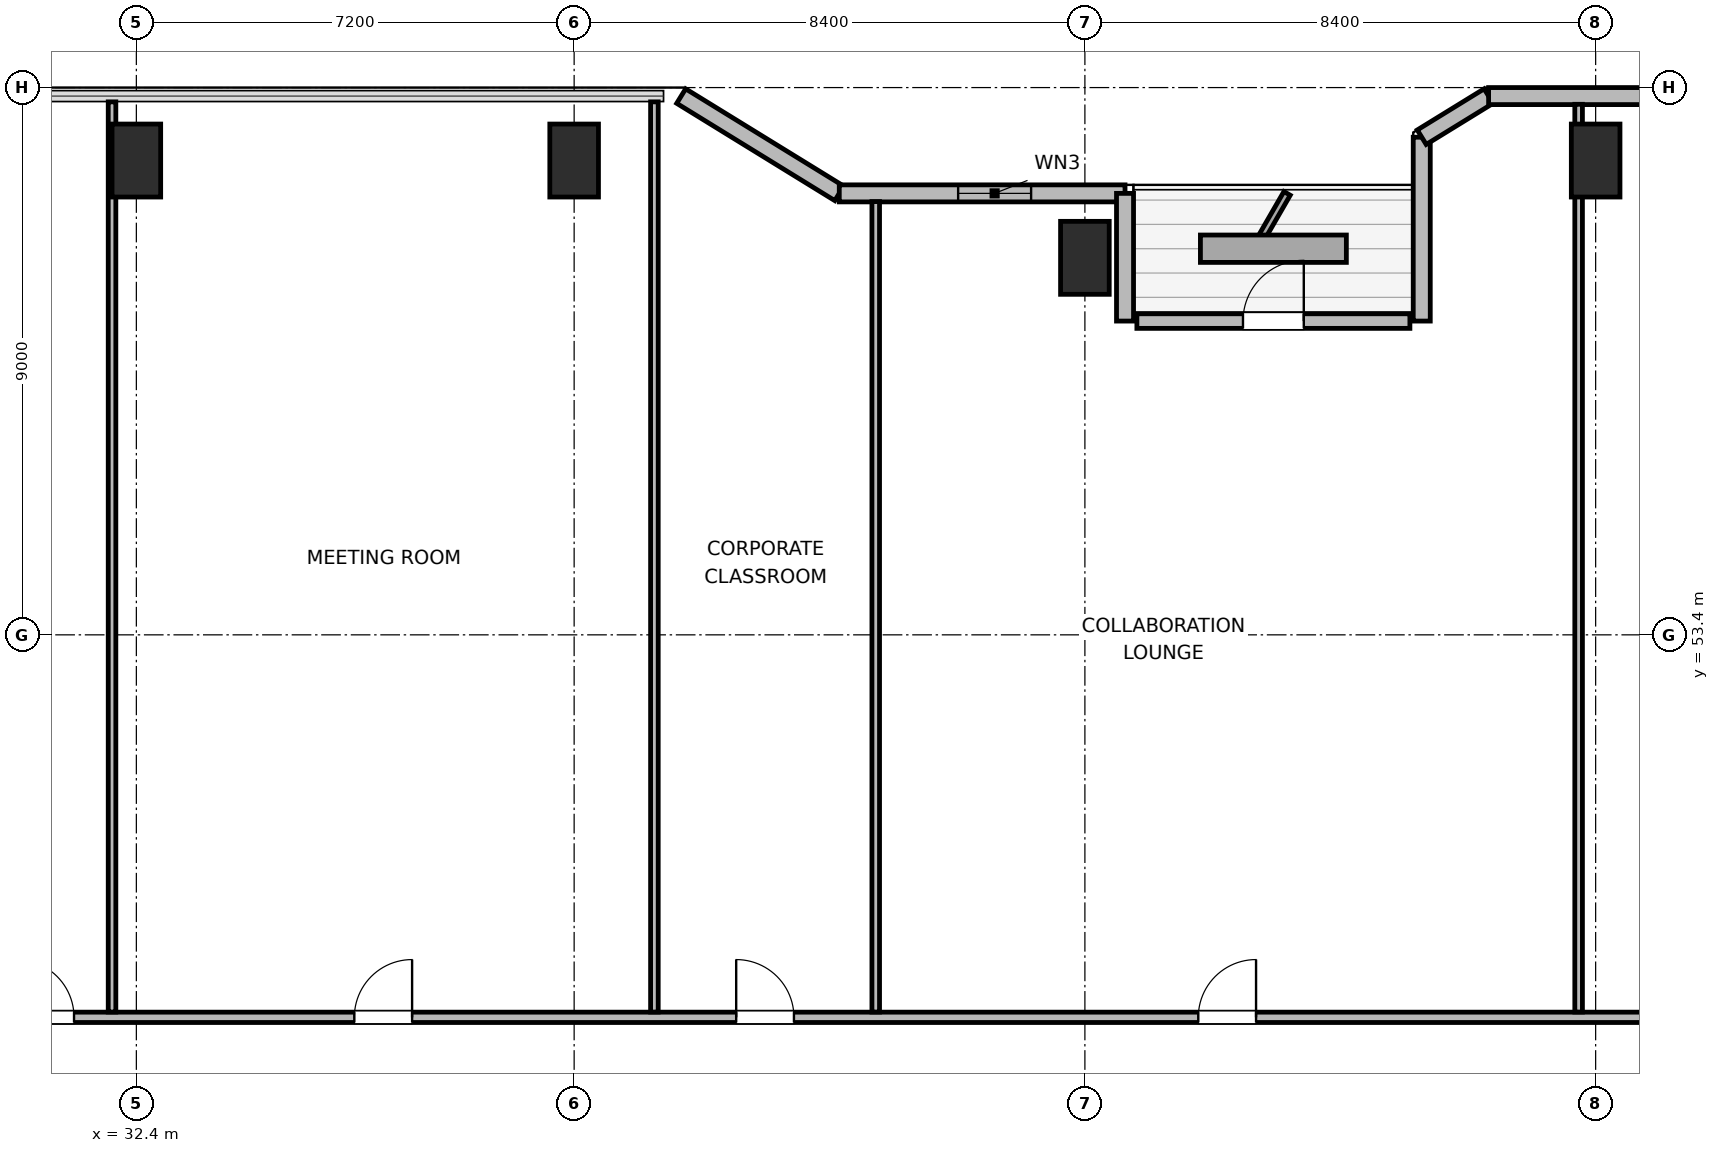
"""IFC4 building model, lengths in metres.
Left out: names, types, materials, properties, quantities, classifications, styles, units other than length and angle.
Written with IfcOpenShell. Run it as: python <this file> out.ifc"""

import sys

from ifc_helpers import new_model, si_unit, direction, frame, frame_2d, origin, origin_2d, place, context, subcontext, project, spatial, rectangle, extrude, element, fill, save


model = new_model("IFC4")
c1 = context("Model", 3, precision=1e-05, world=origin(), true_north=direction((0.0, 1.0)))
c2 = subcontext(c1, "Body", "Model", "MODEL_VIEW")
j1 = project(units=[si_unit("LENGTHUNIT", "METRE"), si_unit("PLANEANGLEUNIT", "RADIAN")], contexts=[c1])
p1 = place(None, origin())
s1 = spatial("IfcSite", under=j1, at=p1, CompositionType="ELEMENT")
p2 = place(p1, origin())
s2 = spatial("IfcBuilding", under=s1, at=p2, CompositionType="ELEMENT")
p3 = place(p2, frame((0.0, 0.0, 162.3)))
s3 = spatial("IfcBuildingStorey", under=s2, at=p3, CompositionType="ELEMENT", Elevation=162.3)
for number, where, z_axis, x_axis in (
    (1, (32.4, 61.2, 0.0), (0.0, 0.0, 1.0), (1.0, 0.0, 0.0)),
    (2, (39.6, 61.2, 0.0), (0.0, 0.0, 1.0), (1.0, 0.0, 0.0)),
    (3, (48.0, 59.6, 0.0), (0.0, 0.0, 1.0), (1.0, 0.0, 0.0)),
    (4, (56.4, 61.2, 0.0), (0.0, 0.0, 1.0), (1.0, 0.0, 0.0)),
):
    element("IfcColumn", number, at=place(p3, frame(where, z_axis=z_axis, x_axis=x_axis)), inside=s3, PredefinedType="COLUMN", context=c2, shape_type="SweptSolid", body=[
        extrude(rectangle(XDim=0.8, YDim=1.2, at=origin_2d()), origin(), (0.0, 0.0, 1.0), 3.9),
    ])
p4 = place(p3, frame((41.36, 62.26, 0.0), z_axis=(0.0, 0.0, 1.0), x_axis=(0.851652825334, -0.524106349037, 0.0)))
e5 = element("IfcWall", 5, at=p4, inside=s3, PredefinedType="SOLIDWALL", context=c2, shape_type="SweptSolid", body=[
    extrude(rectangle(XDim=3.053, YDim=0.28, at=frame_2d((1.526, 0.0))), origin(), (0.0, 0.0, 1.0), 2.265),
])
p5 = place(p3, frame((43.96, 60.66, 0.0), z_axis=(0.0, 0.0, 1.0), x_axis=(1.0, 0.0, 0.0)))
e6 = element("IfcWall", 6, at=p5, inside=s3, PredefinedType="SOLIDWALL", context=c2, shape_type="SweptSolid", body=[
    extrude(rectangle(XDim=4.699, YDim=0.28, at=frame_2d((2.35, 0.0))), origin(), (0.0, 0.0, 1.0), 2.265),
])
p6 = place(p5, frame((1.955, 0.0, 0.85)))
e7 = element("IfcOpeningElement", 7, at=p6, cuts=e6, PredefinedType="OPENING", context=c2, shape_type="SweptSolid", body=[
    extrude(rectangle(XDim=1.2, YDim=1.1, at=frame_2d((0.6, 0.55))), frame((0.0, 0.15, 0.0), z_axis=(0.0, -1.0, 0.0), x_axis=(1.0, 0.0, 0.0)), (0.0, 0.0, 1.0), 0.3),
])
p7 = place(p3, frame((48.66, 60.66, 0.0), z_axis=(0.0, 0.0, 1.0), x_axis=(0.0, -1.0, 0.0)))
e8 = element("IfcWall", 8, at=p7, inside=s3, PredefinedType="SOLIDWALL", context=c2, shape_type="SweptSolid", body=[
    extrude(rectangle(XDim=2.1, YDim=0.28, at=frame_2d((1.05, 0.0))), origin(), (0.0, 0.0, 1.0), 2.265),
])
p8 = place(p3, frame((48.855, 58.56, 0.0), z_axis=(0.0, 0.0, 1.0), x_axis=(1.0, 0.0, 0.0)))
e9 = element("IfcWall", 9, at=p8, inside=s3, PredefinedType="SOLIDWALL", context=c2, shape_type="SweptSolid", body=[
    extrude(rectangle(XDim=4.49, YDim=0.24, at=frame_2d((2.245, 0.0))), origin(), (0.0, 0.0, 1.0), 3.68),
])
p9 = place(p8, frame((1.745, 0.0, 0.0)))
e10 = element("IfcOpeningElement", 10, at=p9, cuts=e9, PredefinedType="OPENING", context=c2, shape_type="SweptSolid", body=[
    extrude(rectangle(XDim=1.0, YDim=2.02, at=frame_2d((0.5, 1.01))), frame((0.0, 0.13, 0.0), z_axis=(0.0, -1.0, 0.0), x_axis=(1.0, 0.0, 0.0)), (0.0, 0.0, 1.0), 0.26),
])
p10 = place(p3, frame((53.54, 58.56, 0.0), z_axis=(0.0, 0.0, 1.0), x_axis=(0.0, 1.0, 0.0)))
e11 = element("IfcWall", 11, at=p10, inside=s3, PredefinedType="SOLIDWALL", context=c2, shape_type="SweptSolid", body=[
    extrude(rectangle(XDim=3.024, YDim=0.28, at=frame_2d((1.512, 0.0))), origin(), (0.0, 0.0, 1.0), 2.265),
])
p11 = place(p3, frame((53.54, 61.584, 0.0), z_axis=(0.0, 0.0, 1.0), x_axis=(0.851801140441, 0.523865266212, 0.0)))
e12 = element("IfcWall", 12, at=p11, inside=s3, PredefinedType="SOLIDWALL", context=c2, shape_type="SweptSolid", body=[
    extrude(rectangle(XDim=1.291, YDim=0.28, at=frame_2d((0.646, 0.0))), origin(), (0.0, 0.0, 1.0), 3.68),
])
p12 = place(p3, frame((54.64, 62.26, 0.0), z_axis=(0.0, 0.0, 1.0), x_axis=(1.0, 0.0, 0.0)))
e13 = element("IfcWall", 13, at=p12, inside=s3, PredefinedType="SOLIDWALL", context=c2, shape_type="SweptSolid", body=[
    extrude(rectangle(XDim=10.742, YDim=0.28, at=frame_2d((5.371, 0.0))), origin(), (0.0, 0.0, 1.0), 3.68),
])
p13 = place(p3, frame((29.8, 47.11, 0.0), z_axis=(0.0, 0.0, 1.0), x_axis=(1.0, 0.0, 0.0)))
e14 = element("IfcWall", 14, at=p13, inside=s3, PredefinedType="PARTITIONING", context=c2, shape_type="SweptSolid", body=[
    extrude(rectangle(XDim=33.8, YDim=0.17, at=frame_2d((16.9, 0.0))), origin(), (0.0, 0.0, 1.0), 3.68),
])
p14 = place(p13, frame((0.625, 0.0, 0.0)))
e15 = element("IfcOpeningElement", 15, at=p14, cuts=e14, PredefinedType="OPENING", context=c2, shape_type="SweptSolid", body=[
    extrude(rectangle(XDim=0.95, YDim=2.04, at=frame_2d((0.475, 1.02))), frame((0.0, 0.095, 0.0), z_axis=(0.0, -1.0, 0.0), x_axis=(1.0, 0.0, 0.0)), (0.0, 0.0, 1.0), 0.19),
])
p15 = place(p13, frame((6.185, 0.0, 0.0)))
e16 = element("IfcOpeningElement", 16, at=p15, cuts=e14, PredefinedType="OPENING", context=c2, shape_type="SweptSolid", body=[
    extrude(rectangle(XDim=0.95, YDim=2.04, at=frame_2d((0.475, 1.02))), frame((0.0, 0.095, 0.0), z_axis=(0.0, -1.0, 0.0), x_axis=(1.0, 0.0, 0.0)), (0.0, 0.0, 1.0), 0.19),
])
p16 = place(p13, frame((12.465, 0.0, 0.0)))
e17 = element("IfcOpeningElement", 17, at=p16, cuts=e14, PredefinedType="OPENING", context=c2, shape_type="SweptSolid", body=[
    extrude(rectangle(XDim=0.95, YDim=2.04, at=frame_2d((0.475, 1.02))), frame((0.0, 0.095, 0.0), z_axis=(0.0, -1.0, 0.0), x_axis=(1.0, 0.0, 0.0)), (0.0, 0.0, 1.0), 0.19),
])
p17 = place(p13, frame((20.065, 0.0, 0.0)))
e18 = element("IfcOpeningElement", 18, at=p17, cuts=e14, PredefinedType="OPENING", context=c2, shape_type="SweptSolid", body=[
    extrude(rectangle(XDim=0.95, YDim=2.04, at=frame_2d((0.475, 1.02))), frame((0.0, 0.095, 0.0), z_axis=(0.0, -1.0, 0.0), x_axis=(1.0, 0.0, 0.0)), (0.0, 0.0, 1.0), 0.19),
])
p18 = place(p13, frame((29.585, 0.0, 0.0)))
e19 = element("IfcOpeningElement", 19, at=p18, cuts=e14, PredefinedType="OPENING", context=c2, shape_type="SweptSolid", body=[
    extrude(rectangle(XDim=0.95, YDim=2.04, at=frame_2d((0.475, 1.02))), frame((0.0, 0.095, 0.0), z_axis=(0.0, -1.0, 0.0), x_axis=(1.0, 0.0, 0.0)), (0.0, 0.0, 1.0), 0.19),
])
p19 = place(p3, frame((32.0, 47.197, 0.0), z_axis=(0.0, 0.0, 1.0), x_axis=(0.0, 1.0, 0.0)))
e20 = element("IfcWall", 20, at=p19, inside=s3, PredefinedType="PARTITIONING", context=c2, shape_type="SweptSolid", body=[
    extrude(rectangle(XDim=14.968, YDim=0.125, at=frame_2d((7.484, 0.0))), origin(), (0.0, 0.0, 1.0), 3.68),
])
p20 = place(p3, frame((40.92, 47.197, 0.0), z_axis=(0.0, 0.0, 1.0), x_axis=(0.0, 1.0, 0.0)))
e21 = element("IfcWall", 21, at=p20, inside=s3, PredefinedType="PARTITIONING", context=c2, shape_type="SweptSolid", body=[
    extrude(rectangle(XDim=14.968, YDim=0.125, at=frame_2d((7.484, 0.0))), origin(), (0.0, 0.0, 1.0), 3.043),
])
p21 = place(p3, frame((44.56, 47.197, 0.0), z_axis=(0.0, 0.0, 1.0), x_axis=(0.0, 1.0, 0.0)))
e22 = element("IfcWall", 22, at=p21, inside=s3, PredefinedType="PARTITIONING", context=c2, shape_type="SweptSolid", body=[
    extrude(rectangle(XDim=13.328, YDim=0.125, at=frame_2d((6.664, 0.0))), origin(), (0.0, 0.0, 1.0), 3.043),
])
p22 = place(p3, frame((56.12, 47.197, 0.0), z_axis=(0.0, 0.0, 1.0), x_axis=(0.0, 1.0, 0.0)))
e23 = element("IfcWall", 23, at=p22, inside=s3, PredefinedType="PARTITIONING", context=c2, shape_type="SweptSolid", body=[
    extrude(rectangle(XDim=14.928, YDim=0.125, at=frame_2d((7.464, 0.0))), origin(), (0.0, 0.0, 1.0), 3.043),
])
p23 = place(p6, origin())
e24 = element("IfcWindow", 24, at=p23, inside=s3, PartitioningType="SINGLE_PANEL", PredefinedType="WINDOW", context=c2, shape_type="SweptSolid", body=[
    extrude(rectangle(XDim=1.2, YDim=1.1, at=frame_2d((0.6, 0.55))), frame((0.0, 0.03, 0.0), z_axis=(0.0, -1.0, 0.0), x_axis=(1.0, 0.0, 0.0)), (0.0, 0.0, 1.0), 0.06),
])
fill(e7, e24)
p24 = place(p9, origin())
e25 = element("IfcDoor", 25, at=p24, inside=s3, OperationType="SINGLE_SWING_RIGHT", PredefinedType="DOOR", context=c2, shape_type="SweptSolid", body=[
    extrude(rectangle(XDim=1.0, YDim=2.02, at=frame_2d((0.5, 1.01))), frame((0.0, 0.025, 0.0), z_axis=(0.0, -1.0, 0.0), x_axis=(1.0, 0.0, 0.0)), (0.0, 0.0, 1.0), 0.05),
])
fill(e10, e25)
p25 = place(p14, origin())
e26 = element("IfcDoor", 26, at=p25, inside=s3, OperationType="SINGLE_SWING_LEFT", PredefinedType="DOOR", context=c2, shape_type="SweptSolid", body=[
    extrude(rectangle(XDim=0.95, YDim=2.04, at=frame_2d((0.475, 1.02))), frame((0.0, 0.025, 0.0), z_axis=(0.0, -1.0, 0.0), x_axis=(1.0, 0.0, 0.0)), (0.0, 0.0, 1.0), 0.05),
])
fill(e15, e26)
p26 = place(p15, origin())
e27 = element("IfcDoor", 27, at=p26, inside=s3, OperationType="SINGLE_SWING_RIGHT", PredefinedType="DOOR", context=c2, shape_type="SweptSolid", body=[
    extrude(rectangle(XDim=0.95, YDim=2.04, at=frame_2d((0.475, 1.02))), frame((0.0, 0.025, 0.0), z_axis=(0.0, -1.0, 0.0), x_axis=(1.0, 0.0, 0.0)), (0.0, 0.0, 1.0), 0.05),
])
fill(e16, e27)
p27 = place(p16, origin())
e28 = element("IfcDoor", 28, at=p27, inside=s3, OperationType="SINGLE_SWING_LEFT", PredefinedType="DOOR", context=c2, shape_type="SweptSolid", body=[
    extrude(rectangle(XDim=0.95, YDim=2.04, at=frame_2d((0.475, 1.02))), frame((0.0, 0.025, 0.0), z_axis=(0.0, -1.0, 0.0), x_axis=(1.0, 0.0, 0.0)), (0.0, 0.0, 1.0), 0.05),
])
fill(e17, e28)
p28 = place(p17, origin())
e29 = element("IfcDoor", 29, at=p28, inside=s3, OperationType="SINGLE_SWING_RIGHT", PredefinedType="DOOR", context=c2, shape_type="SweptSolid", body=[
    extrude(rectangle(XDim=0.95, YDim=2.04, at=frame_2d((0.475, 1.02))), frame((0.0, 0.025, 0.0), z_axis=(0.0, -1.0, 0.0), x_axis=(1.0, 0.0, 0.0)), (0.0, 0.0, 1.0), 0.05),
])
fill(e18, e29)
save(model, sys.argv[1])
